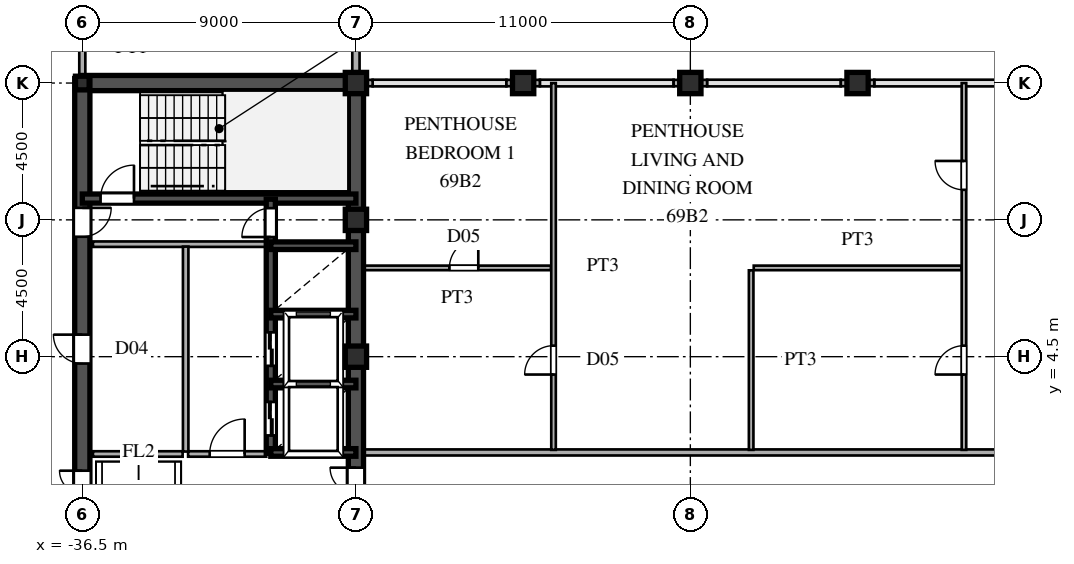
"""IFC4 building model, lengths in metres.
Left out: names, types, materials, properties, quantities, classifications, styles, units other than length and angle.
Written with IfcOpenShell. Run it as: python <this file> out.ifc"""

import sys

from ifc_helpers import new_model, si_unit, direction, frame, frame_2d, origin, origin_2d, place, context, subcontext, project, spatial, rectangle, hollow_rectangle, i_section, extrude, source, transform, mapped, element, fill, save


model = new_model("IFC4")
c1 = context("Model", 3, precision=1e-05, world=origin(), true_north=direction((0.0, 1.0)))
c2 = subcontext(c1, "Body", "Model", "MODEL_VIEW")
j1 = project(units=[si_unit("LENGTHUNIT", "METRE"), si_unit("PLANEANGLEUNIT", "RADIAN")], contexts=[c1])
p1 = place(None, origin())
s1 = spatial("IfcSite", under=j1, at=p1, CompositionType="ELEMENT")
p2 = place(p1, origin())
s2 = spatial("IfcBuilding", under=s1, at=p2, CompositionType="ELEMENT")
p3 = place(p2, frame((0.0, 0.0, 261.9)))
s3 = spatial("IfcBuildingStorey", under=s2, at=p3, CompositionType="ELEMENT", Elevation=261.9)
m1 = source(origin(), c2, "Body", "SweptSolid", [
    extrude(hollow_rectangle(XDim=0.7, YDim=0.7, WallThickness=0.03, at=origin_2d()), origin(), (0.0, 0.0, 1.0), 3.75),
])
for number, where, z_axis, x_axis in (
    (1, (-27.5, 4.5, 0.0), (0.0, 0.0, 1.0), (1.0, 0.0, 0.0)),
    (2, (-27.5, 9.0, 0.0), (0.0, 0.0, 1.0), (1.0, 0.0, 0.0)),
    (3, (-27.5, 13.5, 0.0), (0.0, 0.0, 1.0), (1.0, 0.0, 0.0)),
):
    element("IfcColumn", number, at=place(p3, frame(where, z_axis=z_axis, x_axis=x_axis)), inside=s3, PredefinedType="COLUMN", context=c2, shape_type="MappedRepresentation", body=[
        mapped(m1, transform((0.0, 0.0, 0.0), scale=1.0)),
    ])
m2 = source(origin(), c2, "Body", "SweptSolid", [
    extrude(i_section(OverallWidth=0.45, OverallDepth=0.45, WebThickness=0.016, FlangeThickness=0.025, at=origin_2d()), origin(), (0.0, 0.0, 1.0), 3.75),
])
p4 = place(p3, frame((-36.5, 13.5, 0.0), z_axis=(0.0, 0.0, 1.0), x_axis=(1.0, 0.0, 0.0)))
e4 = element("IfcColumn", 4, at=p4, inside=s3, PredefinedType="COLUMN", context=c2, shape_type="MappedRepresentation", body=[
    mapped(m2, transform((0.0, 0.0, 0.0), scale=1.0)),
])
for number, where, z_axis, x_axis in (
    (5, (-22.0, 13.5, 0.0), (0.0, 0.0, 1.0), (1.0, 0.0, 0.0)),
    (6, (-16.5, 13.5, 0.0), (0.0, 0.0, 1.0), (1.0, 0.0, 0.0)),
    (7, (-11.0, 13.5, 0.0), (0.0, 0.0, 1.0), (1.0, 0.0, 0.0)),
):
    element("IfcColumn", number, at=place(p3, frame(where, z_axis=z_axis, x_axis=x_axis)), inside=s3, PredefinedType="COLUMN", context=c2, shape_type="MappedRepresentation", body=[
        mapped(m1, transform((0.0, 0.0, 0.0), scale=1.0)),
    ])
p5 = place(p3, frame((-27.5, 13.755, 0.0), z_axis=(0.0, 0.0, 1.0), x_axis=(0.0, 1.0, 0.0)))
e8 = element("IfcWall", 8, at=p5, inside=s3, PredefinedType="SOLIDWALL", context=c2, shape_type="SweptSolid", body=[
    extrude(rectangle(XDim=0.62, YDim=0.24, at=frame_2d((0.31, 0.0))), origin(), (0.0, 0.0, 1.0), 3.03),
])
p6 = place(p3, frame((-27.5, 14.375, 0.0), z_axis=(0.0, 0.0, 1.0), x_axis=(0.0, 1.0, 0.0)))
e9 = element("IfcWall", 9, at=p6, inside=s3, PredefinedType="SOLIDWALL", context=c2, shape_type="SweptSolid", body=[
    extrude(rectangle(XDim=1.605, YDim=0.24, at=frame_2d((0.803, 0.0))), origin(), (0.0, 0.0, 1.0), 3.53),
])
p7 = place(p3, frame((-27.49, 13.5, 0.0), z_axis=(0.0, 0.0, 1.0), x_axis=(1.0, 0.0, 0.0)))
e10 = element("IfcWall", 10, at=p7, inside=s3, PredefinedType="SOLIDWALL", context=c2, shape_type="SweptSolid", body=[
    extrude(rectangle(XDim=0.54, YDim=0.21, at=frame_2d((0.27, 0.0))), origin(), (0.0, 0.0, 1.0), 3.03),
])
for number, where, z_axis, x_axis in (
    (11, (-22.55, 13.5, 0.0), (0.0, 0.0, 1.0), (1.0, 0.0, 0.0)),
    (12, (-17.05, 13.5, 0.0), (0.0, 0.0, 1.0), (1.0, 0.0, 0.0)),
    (13, (-11.55, 13.5, 0.0), (0.0, 0.0, 1.0), (1.0, 0.0, 0.0)),
):
    element("IfcWall", number, at=place(p3, frame(where, z_axis=z_axis, x_axis=x_axis)), inside=s3, PredefinedType="SOLIDWALL", context=c2, shape_type="SweptSolid", body=[
        extrude(rectangle(XDim=1.1, YDim=0.21, at=frame_2d((0.55, 0.0))), origin(), (0.0, 0.0, 1.0), 3.03),
    ])
p8 = place(p3, frame((-27.5, 1.3, 0.0), z_axis=(0.0, 0.0, 1.0), x_axis=(0.0, 1.0, 0.0)))
e14 = element("IfcWall", 14, at=p8, inside=s3, PredefinedType="SHEAR", context=c2, shape_type="SweptSolid", body=[
    extrude(rectangle(XDim=12.2, YDim=0.5, at=frame_2d((6.1, 0.0))), origin(), (0.0, 0.0, 1.0), 3.53),
])
p9 = place(p3, frame((-27.5, -1.3, 0.0), z_axis=(0.0, 0.0, 1.0), x_axis=(0.0, 1.0, 0.0)))
e15 = element("IfcWall", 15, at=p9, inside=s3, PredefinedType="SHEAR", context=c2, shape_type="SweptSolid", body=[
    extrude(rectangle(XDim=2.6, YDim=0.5, at=frame_2d((1.3, 0.0))), origin(), (0.0, 0.0, 1.0), 3.53),
])
p10 = place(p9, frame((0.45, 0.0, 0.0)))
e16 = element("IfcOpeningElement", 16, at=p10, cuts=e15, PredefinedType="OPENING", context=c2, shape_type="SweptSolid", body=[
    extrude(rectangle(XDim=1.7, YDim=2.35, at=frame_2d((0.85, 1.175))), frame((0.0, 0.26, 0.0), z_axis=(0.0, -1.0, 0.0), x_axis=(1.0, 0.0, 0.0)), (0.0, 0.0, 1.0), 0.52),
])
p11 = place(p3, frame((-36.5, 13.5, 0.0), z_axis=(0.0, 0.0, 1.0), x_axis=(1.0, 0.0, 0.0)))
e17 = element("IfcWall", 17, at=p11, inside=s3, PredefinedType="SHEAR", context=c2, shape_type="SweptSolid", body=[
    extrude(rectangle(XDim=9.0, YDim=0.5, at=frame_2d((4.5, 0.0))), origin(), (0.0, 0.0, 1.0), 3.53),
])
p12 = place(p3, frame((-36.5, -1.3, 0.0), z_axis=(0.0, 0.0, 1.0), x_axis=(0.0, 1.0, 0.0)))
e18 = element("IfcWall", 18, at=p12, inside=s3, PredefinedType="SHEAR", context=c2, shape_type="SweptSolid", body=[
    extrude(rectangle(XDim=2.6, YDim=0.5, at=frame_2d((1.3, 0.0))), origin(), (0.0, 0.0, 1.0), 3.53),
])
p13 = place(p12, frame((0.55, 0.0, 0.0)))
e19 = element("IfcOpeningElement", 19, at=p13, cuts=e18, PredefinedType="OPENING", context=c2, shape_type="SweptSolid", body=[
    extrude(rectangle(XDim=1.5, YDim=2.3, at=frame_2d((0.75, 1.15))), frame((0.0, 0.26, 0.0), z_axis=(0.0, -1.0, 0.0), x_axis=(1.0, 0.0, 0.0)), (0.0, 0.0, 1.0), 0.52),
])
p14 = place(p3, frame((-36.5, 8.2, 0.0), z_axis=(0.0, 0.0, 1.0), x_axis=(0.0, 1.0, 0.0)))
e20 = element("IfcWall", 20, at=p14, inside=s3, PredefinedType="SHEAR", context=c2, shape_type="SweptSolid", body=[
    extrude(rectangle(XDim=5.45, YDim=0.5, at=frame_2d((2.725, 0.0))), origin(), (0.0, 0.0, 1.0), 3.53),
])
p15 = place(p14, frame((0.245, 0.0, 0.0)))
e21 = element("IfcOpeningElement", 21, at=p15, cuts=e20, PredefinedType="OPENING", context=c2, shape_type="SweptSolid", body=[
    extrude(rectangle(XDim=0.95, YDim=2.15, at=frame_2d((0.475, 1.075))), frame((0.0, 0.26, 0.0), z_axis=(0.0, -1.0, 0.0), x_axis=(1.0, 0.0, 0.0)), (0.0, 0.0, 1.0), 0.52),
])
p16 = place(p3, frame((-36.5, 1.3, 0.0), z_axis=(0.0, 0.0, 1.0), x_axis=(0.0, 1.0, 0.0)))
e22 = element("IfcWall", 22, at=p16, inside=s3, PredefinedType="SHEAR", context=c2, shape_type="SweptSolid", body=[
    extrude(rectangle(XDim=6.9, YDim=0.5, at=frame_2d((3.45, 0.0))), origin(), (0.0, 0.0, 1.0), 3.53),
])
p17 = place(p16, frame((2.975, 0.0, 0.0)))
e23 = element("IfcOpeningElement", 23, at=p17, cuts=e22, PredefinedType="OPENING", context=c2, shape_type="SweptSolid", body=[
    extrude(rectangle(XDim=0.95, YDim=2.15, at=frame_2d((0.475, 1.075))), frame((0.0, 0.26, 0.0), z_axis=(0.0, -1.0, 0.0), x_axis=(1.0, 0.0, 0.0)), (0.0, 0.0, 1.0), 0.52),
])
p18 = place(p3, frame((-36.5, 9.7, 0.0), z_axis=(0.0, 0.0, 1.0), x_axis=(1.0, 0.0, 0.0)))
e24 = element("IfcWall", 24, at=p18, inside=s3, PredefinedType="SHEAR", context=c2, shape_type="SweptSolid", body=[
    extrude(rectangle(XDim=9.0, YDim=0.3, at=frame_2d((4.5, 0.0))), origin(), (0.0, 0.0, 1.0), 3.53),
])
p19 = place(p18, frame((0.6, 0.0, 0.0)))
e25 = element("IfcOpeningElement", 25, at=p19, cuts=e24, PredefinedType="OPENING", context=c2, shape_type="SweptSolid", body=[
    extrude(rectangle(XDim=1.1, YDim=2.2, at=frame_2d((0.55, 1.1))), frame((0.0, 0.16, 0.0), z_axis=(0.0, -1.0, 0.0), x_axis=(1.0, 0.0, 0.0)), (0.0, 0.0, 1.0), 0.32),
])
for number, where, z_axis, x_axis in (
    (26, (-30.3, 1.35, 0.0), (0.0, 0.0, 1.0), (1.0, 0.0, 0.0)),
    (27, (-30.3, 3.6, 0.0), (0.0, 0.0, 1.0), (1.0, 0.0, 0.0)),
    (28, (-30.3, 5.9, 0.0), (0.0, 0.0, 1.0), (1.0, 0.0, 0.0)),
    (29, (-30.3, 8.15, 0.0), (0.0, 0.0, 1.0), (1.0, 0.0, 0.0)),
):
    element("IfcWall", number, at=place(p3, frame(where, z_axis=z_axis, x_axis=x_axis)), inside=s3, PredefinedType="SHEAR", context=c2, shape_type="SweptSolid", body=[
        extrude(rectangle(XDim=2.8, YDim=0.25, at=frame_2d((1.4, 0.0))), origin(), (0.0, 0.0, 1.0), 3.53),
    ])
p20 = place(p3, frame((-30.3, 1.32, 0.0), z_axis=(0.0, 0.0, 1.0), x_axis=(0.0, 1.0, 0.0)))
e30 = element("IfcWall", 30, at=p20, inside=s3, PredefinedType="SHEAR", context=c2, shape_type="SweptSolid", body=[
    extrude(rectangle(XDim=2.28, YDim=0.3, at=frame_2d((1.14, 0.0))), origin(), (0.0, 0.0, 1.0), 3.53),
])
p21 = place(p20, frame((0.59, 0.0, 0.0)))
e31 = element("IfcOpeningElement", 31, at=p21, cuts=e30, PredefinedType="OPENING", context=c2, shape_type="SweptSolid", body=[
    extrude(rectangle(XDim=1.1, YDim=2.2, at=frame_2d((0.55, 1.1))), frame((0.0, 0.16, 0.0), z_axis=(0.0, -1.0, 0.0), x_axis=(1.0, 0.0, 0.0)), (0.0, 0.0, 1.0), 0.32),
])
p22 = place(p3, frame((-30.3, 3.6, 0.0), z_axis=(0.0, 0.0, 1.0), x_axis=(0.0, 1.0, 0.0)))
e32 = element("IfcWall", 32, at=p22, inside=s3, PredefinedType="SHEAR", context=c2, shape_type="SweptSolid", body=[
    extrude(rectangle(XDim=2.3, YDim=0.3, at=frame_2d((1.15, 0.0))), origin(), (0.0, 0.0, 1.0), 3.53),
])
p23 = place(p22, frame((0.6, 0.0, 0.0)))
e33 = element("IfcOpeningElement", 33, at=p23, cuts=e32, PredefinedType="OPENING", context=c2, shape_type="SweptSolid", body=[
    extrude(rectangle(XDim=1.1, YDim=2.2, at=frame_2d((0.55, 1.1))), frame((0.0, 0.16, 0.0), z_axis=(0.0, -1.0, 0.0), x_axis=(1.0, 0.0, 0.0)), (0.0, 0.0, 1.0), 0.32),
])
p24 = place(p3, frame((-30.3, 5.9, 0.0), z_axis=(0.0, 0.0, 1.0), x_axis=(0.0, 1.0, 0.0)))
e34 = element("IfcWall", 34, at=p24, inside=s3, PredefinedType="SHEAR", context=c2, shape_type="SweptSolid", body=[
    extrude(rectangle(XDim=2.25, YDim=0.3, at=frame_2d((1.125, 0.0))), origin(), (0.0, 0.0, 1.0), 3.53),
])
p25 = place(p3, frame((-30.3, 8.15, 0.0), z_axis=(0.0, 0.0, 1.0), x_axis=(0.0, 1.0, 0.0)))
e35 = element("IfcWall", 35, at=p25, inside=s3, PredefinedType="SHEAR", context=c2, shape_type="SweptSolid", body=[
    extrude(rectangle(XDim=1.53, YDim=0.3, at=frame_2d((0.765, 0.0))), origin(), (0.0, 0.0, 1.0), 3.53),
])
p26 = place(p25, frame((0.285, 0.0, 0.0)))
e36 = element("IfcOpeningElement", 36, at=p26, cuts=e35, PredefinedType="OPENING", context=c2, shape_type="SweptSolid", body=[
    extrude(rectangle(XDim=0.95, YDim=2.15, at=frame_2d((0.475, 1.075))), frame((0.0, 0.16, 0.0), z_axis=(0.0, -1.0, 0.0), x_axis=(1.0, 0.0, 0.0)), (0.0, 0.0, 1.0), 0.32),
])
p27 = place(p3, frame((-36.15, 8.2, 0.0), z_axis=(0.0, 0.0, 1.0), x_axis=(1.0, 0.0, 0.0)))
e37 = element("IfcWall", 37, at=p27, inside=s3, PredefinedType="PARTITIONING", context=c2, shape_type="SweptSolid", body=[
    extrude(rectangle(XDim=5.7, YDim=0.18, at=frame_2d((2.85, 0.0))), origin(), (0.0, 0.0, 1.0), 3.53),
])
p28 = place(p3, frame((-33.1, 1.38, 0.0), z_axis=(0.0, 0.0, 1.0), x_axis=(0.0, 1.0, 0.0)))
e38 = element("IfcWall", 38, at=p28, inside=s3, PredefinedType="PARTITIONING", context=c2, shape_type="SweptSolid", body=[
    extrude(rectangle(XDim=6.74, YDim=0.18, at=frame_2d((3.37, 0.0))), origin(), (0.0, 0.0, 1.0), 3.53),
])
p29 = place(p3, frame((-33.02, 1.3, 0.0), z_axis=(0.0, 0.0, 1.0), x_axis=(1.0, 0.0, 0.0)))
e39 = element("IfcWall", 39, at=p29, inside=s3, PredefinedType="PARTITIONING", context=c2, shape_type="SweptSolid", body=[
    extrude(rectangle(XDim=2.57, YDim=0.18, at=frame_2d((1.285, 0.0))), origin(), (0.0, 0.0, 1.0), 3.53),
])
p30 = place(p29, frame((0.71, 0.0, 0.0)))
e40 = element("IfcOpeningElement", 40, at=p30, cuts=e39, PredefinedType="OPENING", context=c2, shape_type="SweptSolid", body=[
    extrude(rectangle(XDim=1.15, YDim=2.2, at=frame_2d((0.575, 1.1))), frame((0.0, 0.1, 0.0), z_axis=(0.0, -1.0, 0.0), x_axis=(1.0, 0.0, 0.0)), (0.0, 0.0, 1.0), 0.2),
])
p31 = place(p3, frame((-36.15, 1.3, 0.0), z_axis=(0.0, 0.0, 1.0), x_axis=(1.0, 0.0, 0.0)))
e41 = element("IfcWall", 41, at=p31, inside=s3, PredefinedType="PARTITIONING", context=c2, shape_type="SweptSolid", body=[
    extrude(rectangle(XDim=2.95, YDim=0.18, at=frame_2d((1.475, 0.0))), origin(), (0.0, 0.0, 1.0), 3.53),
])
p32 = place(p3, frame((-27.245, 1.35, 0.0), z_axis=(0.0, 0.0, 1.0), x_axis=(1.0, 0.0, 0.0)))
e42 = element("IfcWall", 42, at=p32, inside=s3, PredefinedType="PARTITIONING", context=c2, shape_type="SweptSolid", body=[
    extrude(rectangle(XDim=54.49, YDim=0.2, at=frame_2d((27.245, 0.0))), origin(), (0.0, 0.0, 1.0), 3.53),
])
p33 = place(p32, frame((22.47, 0.0, 0.0)))
e43 = element("IfcOpeningElement", 43, at=p33, cuts=e42, PredefinedType="OPENING", context=c2, shape_type="SweptSolid", body=[
    extrude(rectangle(XDim=1.05, YDim=2.25, at=frame_2d((0.525, 1.125))), frame((0.0, 0.11, 0.0), z_axis=(0.0, -1.0, 0.0), x_axis=(1.0, 0.0, 0.0)), (0.0, 0.0, 1.0), 0.22),
])
p34 = place(p3, frame((-27.245, 7.42, 0.0), z_axis=(0.0, 0.0, 1.0), x_axis=(1.0, 0.0, 0.0)))
e44 = element("IfcWall", 44, at=p34, inside=s3, PredefinedType="PARTITIONING", context=c2, shape_type="SweptSolid", body=[
    extrude(rectangle(XDim=6.16, YDim=0.15, at=frame_2d((3.08, 0.0))), origin(), (0.0, 0.0, 1.0), 3.53),
])
p35 = place(p34, frame((2.82, 0.0, 0.0)))
e45 = element("IfcOpeningElement", 45, at=p35, cuts=e44, PredefinedType="OPENING", context=c2, shape_type="SweptSolid", body=[
    extrude(rectangle(XDim=0.95, YDim=2.15, at=frame_2d((0.475, 1.075))), frame((0.0, 0.085, 0.0), z_axis=(0.0, -1.0, 0.0), x_axis=(1.0, 0.0, 0.0)), (0.0, 0.0, 1.0), 0.17),
])
p36 = place(p3, frame((-14.415, 7.42, 0.0), z_axis=(0.0, 0.0, 1.0), x_axis=(1.0, 0.0, 0.0)))
e46 = element("IfcWall", 46, at=p36, inside=s3, PredefinedType="PARTITIONING", context=c2, shape_type="SweptSolid", body=[
    extrude(rectangle(XDim=6.83, YDim=0.15, at=frame_2d((3.415, 0.0))), origin(), (0.0, 0.0, 1.0), 3.53),
])
p37 = place(p3, frame((-36.5, 13.755, 0.0), z_axis=(0.0, 0.0, 1.0), x_axis=(0.0, 1.0, 0.0)))
e47 = element("IfcWall", 47, at=p37, inside=s3, PredefinedType="PARTITIONING", context=c2, shape_type="SweptSolid", body=[
    extrude(rectangle(XDim=1.76, YDim=0.2, at=frame_2d((0.88, 0.0))), origin(), (0.0, 0.0, 1.0), 2.93),
])
p38 = place(p3, frame((-21.0, 1.435, 0.0), z_axis=(0.0, 0.0, 1.0), x_axis=(0.0, 1.0, 0.0)))
e48 = element("IfcWall", 48, at=p38, inside=s3, PredefinedType="PARTITIONING", context=c2, shape_type="SweptSolid", body=[
    extrude(rectangle(XDim=12.065, YDim=0.15, at=frame_2d((6.032, 0.0))), origin(), (0.0, 0.0, 1.0), 3.53),
])
p39 = place(p38, frame((2.478, 0.0, 0.0)))
e49 = element("IfcOpeningElement", 49, at=p39, cuts=e48, PredefinedType="OPENING", context=c2, shape_type="SweptSolid", body=[
    extrude(rectangle(XDim=0.95, YDim=2.15, at=frame_2d((0.475, 1.075))), frame((0.0, 0.085, 0.0), z_axis=(0.0, -1.0, 0.0), x_axis=(1.0, 0.0, 0.0)), (0.0, 0.0, 1.0), 0.17),
])
p40 = place(p3, frame((-14.5, 1.435, 0.0), z_axis=(0.0, 0.0, 1.0), x_axis=(0.0, 1.0, 0.0)))
e50 = element("IfcWall", 50, at=p40, inside=s3, PredefinedType="PARTITIONING", context=c2, shape_type="SweptSolid", body=[
    extrude(rectangle(XDim=5.905, YDim=0.15, at=frame_2d((2.953, 0.0))), origin(), (0.0, 0.0, 1.0), 3.53),
])
p41 = place(p3, frame((-7.5, 1.435, 0.0), z_axis=(0.0, 0.0, 1.0), x_axis=(0.0, 1.0, 0.0)))
e51 = element("IfcWall", 51, at=p41, inside=s3, PredefinedType="PARTITIONING", context=c2, shape_type="SweptSolid", body=[
    extrude(rectangle(XDim=12.065, YDim=0.15, at=frame_2d((6.032, 0.0))), origin(), (0.0, 0.0, 1.0), 3.53),
])
p42 = place(p41, frame((2.478, 0.0, 0.0)))
e52 = element("IfcOpeningElement", 52, at=p42, cuts=e51, PredefinedType="OPENING", context=c2, shape_type="SweptSolid", body=[
    extrude(rectangle(XDim=0.95, YDim=2.15, at=frame_2d((0.475, 1.075))), frame((0.0, 0.085, 0.0), z_axis=(0.0, -1.0, 0.0), x_axis=(1.0, 0.0, 0.0)), (0.0, 0.0, 1.0), 0.17),
])
p43 = place(p41, frame((8.552, 0.0, 0.0)))
e53 = element("IfcOpeningElement", 53, at=p43, cuts=e51, PredefinedType="OPENING", context=c2, shape_type="SweptSolid", body=[
    extrude(rectangle(XDim=0.95, YDim=2.15, at=frame_2d((0.475, 1.075))), frame((0.0, 0.085, 0.0), z_axis=(0.0, -1.0, 0.0), x_axis=(1.0, 0.0, 0.0)), (0.0, 0.0, 1.0), 0.17),
])
m3 = source(origin(), c2, "Body", "SweptSolid", [
    extrude(rectangle(XDim=1.7, YDim=2.35, at=frame_2d((0.85, 1.175))), frame((0.0, 0.025, 0.0), z_axis=(0.0, -1.0, 0.0), x_axis=(1.0, 0.0, 0.0)), (0.0, 0.0, 1.0), 0.05),
])
p44 = place(p10, origin())
e54 = element("IfcDoor", 54, at=p44, inside=s3, OperationType="DOUBLE_SWING_LEFT", PredefinedType="DOOR", context=c2, shape_type="MappedRepresentation", body=[
    mapped(m3, transform((0.0, 0.0, 0.0), scale=1.0)),
])
fill(e16, e54)
m4 = source(origin(), c2, "Body", "SweptSolid", [
    extrude(rectangle(XDim=1.5, YDim=2.3, at=frame_2d((0.75, 1.15))), frame((0.0, 0.025, 0.0), z_axis=(0.0, -1.0, 0.0), x_axis=(1.0, 0.0, 0.0)), (0.0, 0.0, 1.0), 0.05),
])
p45 = place(p13, origin())
e55 = element("IfcDoor", 55, at=p45, inside=s3, OperationType="DOUBLE_SWING_LEFT", PredefinedType="DOOR", context=c2, shape_type="MappedRepresentation", body=[
    mapped(m4, transform((0.0, 0.0, 0.0), scale=1.0)),
])
fill(e19, e55)
m5 = source(origin(), c2, "Body", "SweptSolid", [
    extrude(rectangle(XDim=0.95, YDim=2.15, at=frame_2d((0.475, 1.075))), frame((0.0, 0.025, 0.0), z_axis=(0.0, -1.0, 0.0), x_axis=(1.0, 0.0, 0.0)), (0.0, 0.0, 1.0), 0.05),
])
p46 = place(p15, frame((0.95, 0.0, 0.0), z_axis=(0.0, 0.0, 1.0), x_axis=(-1.0, 0.0, 0.0)))
e56 = element("IfcDoor", 56, at=p46, inside=s3, OperationType="SINGLE_SWING_RIGHT", PredefinedType="DOOR", context=c2, shape_type="MappedRepresentation", body=[
    mapped(m5, transform((0.0, 0.0, 0.0), scale=1.0)),
])
fill(e21, e56)
p47 = place(p17, origin())
e57 = element("IfcDoor", 57, at=p47, inside=s3, OperationType="SINGLE_SWING_RIGHT", PredefinedType="DOOR", context=c2, shape_type="MappedRepresentation", body=[
    mapped(m5, transform((0.0, 0.0, 0.0), scale=1.0)),
])
fill(e23, e57)
m6 = source(origin(), c2, "Body", "SweptSolid", [
    extrude(rectangle(XDim=1.1, YDim=2.2, at=frame_2d((0.55, 1.1))), frame((0.0, 0.025, 0.0), z_axis=(0.0, -1.0, 0.0), x_axis=(1.0, 0.0, 0.0)), (0.0, 0.0, 1.0), 0.05),
])
p48 = place(p19, origin())
e58 = element("IfcDoor", 58, at=p48, inside=s3, OperationType="SINGLE_SWING_RIGHT", PredefinedType="DOOR", context=c2, shape_type="MappedRepresentation", body=[
    mapped(m6, transform((0.0, 0.0, 0.0), scale=1.0)),
])
fill(e25, e58)
m7 = source(origin(), c2, "Body", "SweptSolid", [
    extrude(rectangle(XDim=1.1, YDim=2.2, at=frame_2d((0.55, 1.1))), frame((0.0, 0.025, 0.0), z_axis=(0.0, -1.0, 0.0), x_axis=(1.0, 0.0, 0.0)), (0.0, 0.0, 1.0), 0.05),
])
p49 = place(p21, origin())
e59 = element("IfcDoor", 59, at=p49, inside=s3, OperationType="DOUBLE_DOOR_SLIDING", PredefinedType="DOOR", context=c2, shape_type="MappedRepresentation", body=[
    mapped(m7, transform((0.0, 0.0, 0.0), scale=1.0)),
])
fill(e31, e59)
p50 = place(p23, origin())
e60 = element("IfcDoor", 60, at=p50, inside=s3, OperationType="DOUBLE_DOOR_SLIDING", PredefinedType="DOOR", context=c2, shape_type="MappedRepresentation", body=[
    mapped(m7, transform((0.0, 0.0, 0.0), scale=1.0)),
])
fill(e33, e60)
p51 = place(p26, origin())
e61 = element("IfcDoor", 61, at=p51, inside=s3, OperationType="SINGLE_SWING_LEFT", PredefinedType="DOOR", context=c2, shape_type="MappedRepresentation", body=[
    mapped(m5, transform((0.0, 0.0, 0.0), scale=1.0)),
])
fill(e36, e61)
m8 = source(origin(), c2, "Body", "SweptSolid", [
    extrude(rectangle(XDim=1.15, YDim=2.2, at=frame_2d((0.575, 1.1))), frame((0.0, 0.025, 0.0), z_axis=(0.0, -1.0, 0.0), x_axis=(1.0, 0.0, 0.0)), (0.0, 0.0, 1.0), 0.05),
])
p52 = place(p30, origin())
e62 = element("IfcDoor", 62, at=p52, inside=s3, OperationType="SINGLE_SWING_RIGHT", PredefinedType="DOOR", context=c2, shape_type="MappedRepresentation", body=[
    mapped(m8, transform((0.0, 0.0, 0.0), scale=1.0)),
])
fill(e40, e62)
m9 = source(origin(), c2, "Body", "SweptSolid", [
    extrude(rectangle(XDim=0.95, YDim=2.15, at=frame_2d((0.475, 1.075))), frame((0.0, 0.025, 0.0), z_axis=(0.0, -1.0, 0.0), x_axis=(1.0, 0.0, 0.0)), (0.0, 0.0, 1.0), 0.05),
])
p53 = place(p35, origin())
e63 = element("IfcDoor", 63, at=p53, inside=s3, OperationType="SINGLE_SWING_RIGHT", PredefinedType="DOOR", context=c2, shape_type="MappedRepresentation", body=[
    mapped(m9, transform((0.0, 0.0, 0.0), scale=1.0)),
])
fill(e45, e63)
p54 = place(p39, origin())
e64 = element("IfcDoor", 64, at=p54, inside=s3, OperationType="SINGLE_SWING_LEFT", PredefinedType="DOOR", context=c2, shape_type="MappedRepresentation", body=[
    mapped(m9, transform((0.0, 0.0, 0.0), scale=1.0)),
])
fill(e49, e64)
p55 = place(p42, origin())
e65 = element("IfcDoor", 65, at=p55, inside=s3, OperationType="SINGLE_SWING_LEFT", PredefinedType="DOOR", context=c2, shape_type="MappedRepresentation", body=[
    mapped(m9, transform((0.0, 0.0, 0.0), scale=1.0)),
])
fill(e52, e65)
p56 = place(p43, origin())
e66 = element("IfcDoor", 66, at=p56, inside=s3, OperationType="SINGLE_SWING_RIGHT", PredefinedType="DOOR", context=c2, shape_type="MappedRepresentation", body=[
    mapped(m9, transform((0.0, 0.0, 0.0), scale=1.0)),
])
fill(e53, e66)
save(model, sys.argv[1])
